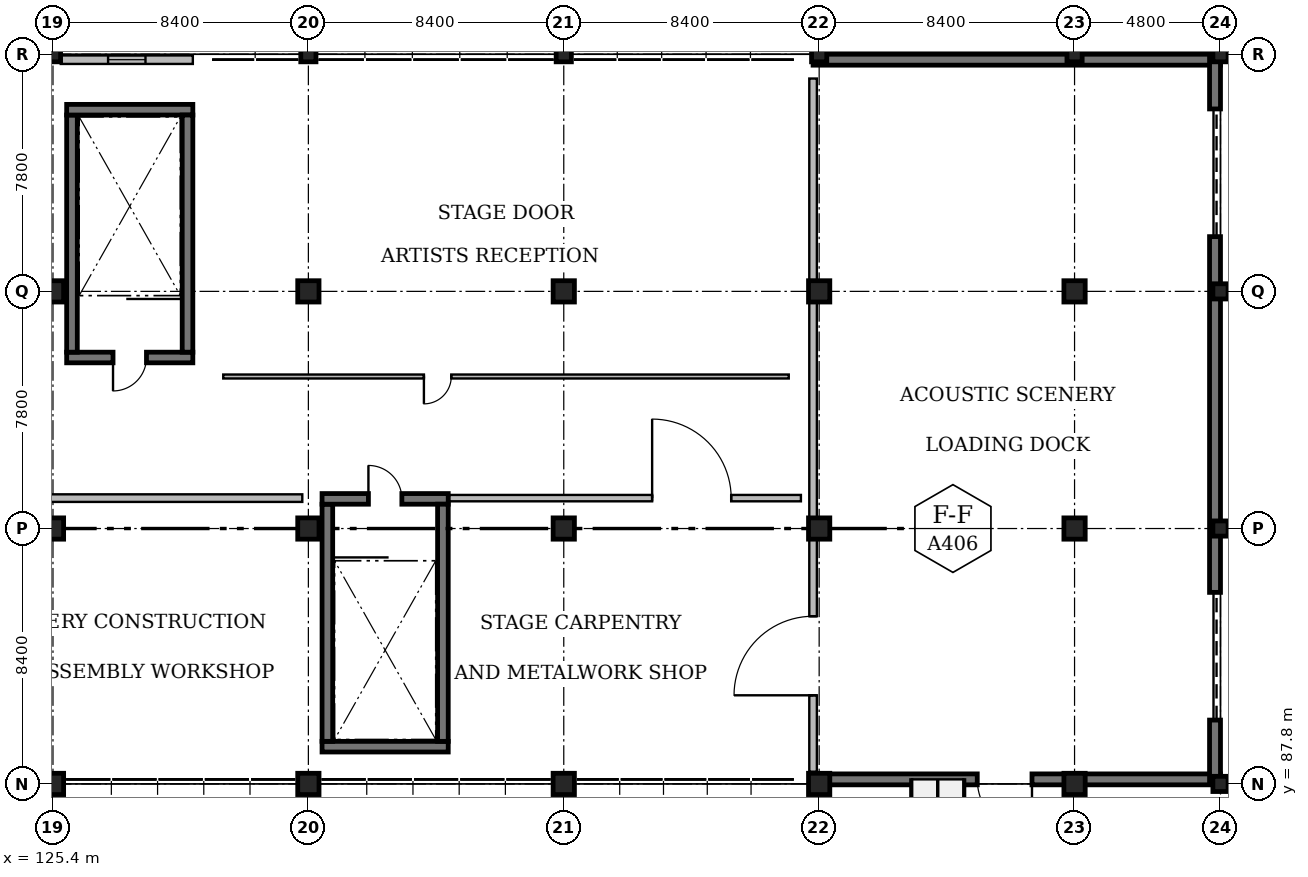
"""IFC4 building model, lengths in metres.
Left out: names, types, materials, properties, quantities, classifications, styles, units other than length and angle.
Written with IfcOpenShell. Run it as: python <this file> out.ifc"""

import sys

from ifc_helpers import new_model, si_unit, direction, frame, frame_2d, origin, origin_2d, place, context, subcontext, project, spatial, rectangle, extrude, element, fill, save


model = new_model("IFC4")
c1 = context("Model", 3, precision=1e-05, world=origin(), true_north=direction((0.0, 1.0)))
c2 = subcontext(c1, "Body", "Model", "MODEL_VIEW")
j1 = project(units=[si_unit("LENGTHUNIT", "METRE"), si_unit("PLANEANGLEUNIT", "RADIAN")], contexts=[c1])
p1 = place(None, origin())
s1 = spatial("IfcSite", under=j1, at=p1, CompositionType="ELEMENT")
p2 = place(p1, origin())
s2 = spatial("IfcBuilding", under=s1, at=p2, CompositionType="ELEMENT")
p3 = place(p2, origin())
s3 = spatial("IfcBuildingStorey", under=s2, at=p3, CompositionType="ELEMENT", Elevation=0.0)
for number, where, z_axis, x_axis in (
    (1, (125.4, 87.8, 0.0), (0.0, 0.0, 1.0), (1.0, 0.0, 0.0)),
    (2, (125.4, 96.2, 0.0), (0.0, 0.0, 1.0), (1.0, 0.0, 0.0)),
    (3, (125.4, 104.0, 0.0), (0.0, 0.0, 1.0), (1.0, 0.0, 0.0)),
):
    element("IfcColumn", number, at=place(p3, frame(where, z_axis=z_axis, x_axis=x_axis)), inside=s3, PredefinedType="COLUMN", context=c2, shape_type="SweptSolid", body=[
        extrude(rectangle(XDim=0.7, YDim=0.7, at=origin_2d()), origin(), (0.0, 0.0, 1.0), 4.8),
    ])
p4 = place(p3, frame((125.4, 111.8, 0.0), z_axis=(0.0, 0.0, 1.0), x_axis=(1.0, 0.0, 0.0)))
e4 = element("IfcColumn", 4, at=p4, inside=s3, PredefinedType="COLUMN", context=c2, shape_type="SweptSolid", body=[
    extrude(rectangle(XDim=0.5, YDim=0.5, at=origin_2d()), origin(), (0.0, 0.0, 1.0), 4.8),
])
for number, where, z_axis, x_axis in (
    (5, (133.8, 87.8, 0.0), (0.0, 0.0, 1.0), (1.0, 0.0, 0.0)),
    (6, (133.8, 96.2, 0.0), (0.0, 0.0, 1.0), (1.0, 0.0, 0.0)),
    (7, (133.8, 104.0, 0.0), (0.0, 0.0, 1.0), (1.0, 0.0, 0.0)),
):
    element("IfcColumn", number, at=place(p3, frame(where, z_axis=z_axis, x_axis=x_axis)), inside=s3, PredefinedType="COLUMN", context=c2, shape_type="SweptSolid", body=[
        extrude(rectangle(XDim=0.7, YDim=0.7, at=origin_2d()), origin(), (0.0, 0.0, 1.0), 4.8),
    ])
p5 = place(p3, frame((133.8, 111.8, 0.0), z_axis=(0.0, 0.0, 1.0), x_axis=(1.0, 0.0, 0.0)))
e8 = element("IfcColumn", 8, at=p5, inside=s3, PredefinedType="COLUMN", context=c2, shape_type="SweptSolid", body=[
    extrude(rectangle(XDim=0.5, YDim=0.5, at=origin_2d()), origin(), (0.0, 0.0, 1.0), 4.8),
])
for number, where, z_axis, x_axis in (
    (9, (142.2, 87.8, 0.0), (0.0, 0.0, 1.0), (1.0, 0.0, 0.0)),
    (10, (142.2, 96.2, 0.0), (0.0, 0.0, 1.0), (1.0, 0.0, 0.0)),
    (11, (142.2, 104.0, 0.0), (0.0, 0.0, 1.0), (1.0, 0.0, 0.0)),
):
    element("IfcColumn", number, at=place(p3, frame(where, z_axis=z_axis, x_axis=x_axis)), inside=s3, PredefinedType="COLUMN", context=c2, shape_type="SweptSolid", body=[
        extrude(rectangle(XDim=0.7, YDim=0.7, at=origin_2d()), origin(), (0.0, 0.0, 1.0), 4.8),
    ])
p6 = place(p3, frame((142.2, 111.8, 0.0), z_axis=(0.0, 0.0, 1.0), x_axis=(1.0, 0.0, 0.0)))
e12 = element("IfcColumn", 12, at=p6, inside=s3, PredefinedType="COLUMN", context=c2, shape_type="SweptSolid", body=[
    extrude(rectangle(XDim=0.5, YDim=0.5, at=origin_2d()), origin(), (0.0, 0.0, 1.0), 4.8),
])
for number, where, z_axis, x_axis in (
    (13, (150.6, 87.8, 0.0), (0.0, 0.0, 1.0), (1.0, 0.0, 0.0)),
    (14, (150.6, 96.2, 0.0), (0.0, 0.0, 1.0), (1.0, 0.0, 0.0)),
    (15, (150.6, 104.0, 0.0), (0.0, 0.0, 1.0), (1.0, 0.0, 0.0)),
):
    element("IfcColumn", number, at=place(p3, frame(where, z_axis=z_axis, x_axis=x_axis)), inside=s3, PredefinedType="COLUMN", context=c2, shape_type="SweptSolid", body=[
        extrude(rectangle(XDim=0.7, YDim=0.7, at=origin_2d()), origin(), (0.0, 0.0, 1.0), 4.8),
    ])
p7 = place(p3, frame((150.6, 111.8, 0.0), z_axis=(0.0, 0.0, 1.0), x_axis=(1.0, 0.0, 0.0)))
e16 = element("IfcColumn", 16, at=p7, inside=s3, PredefinedType="COLUMN", context=c2, shape_type="SweptSolid", body=[
    extrude(rectangle(XDim=0.5, YDim=0.5, at=origin_2d()), origin(), (0.0, 0.0, 1.0), 4.8),
])
for number, where, z_axis, x_axis in (
    (17, (159.0, 87.8, 0.0), (0.0, 0.0, 1.0), (1.0, 0.0, 0.0)),
    (18, (159.0, 96.2, 0.0), (0.0, 0.0, 1.0), (1.0, 0.0, 0.0)),
    (19, (159.0, 104.0, 0.0), (0.0, 0.0, 1.0), (1.0, 0.0, 0.0)),
):
    element("IfcColumn", number, at=place(p3, frame(where, z_axis=z_axis, x_axis=x_axis)), inside=s3, PredefinedType="COLUMN", context=c2, shape_type="SweptSolid", body=[
        extrude(rectangle(XDim=0.7, YDim=0.7, at=origin_2d()), origin(), (0.0, 0.0, 1.0), 4.66),
    ])
for number, where, z_axis, x_axis in (
    (20, (159.0, 111.8, 0.0), (0.0, 0.0, 1.0), (1.0, 0.0, 0.0)),
    (21, (163.8, 87.8, 0.0), (0.0, 0.0, 1.0), (1.0, 0.0, 0.0)),
    (22, (163.8, 96.2, 0.0), (0.0, 0.0, 1.0), (1.0, 0.0, 0.0)),
    (23, (163.8, 104.0, 0.0), (0.0, 0.0, 1.0), (1.0, 0.0, 0.0)),
    (24, (163.8, 111.8, 0.0), (0.0, 0.0, 1.0), (1.0, 0.0, 0.0)),
):
    element("IfcColumn", number, at=place(p3, frame(where, z_axis=z_axis, x_axis=x_axis)), inside=s3, PredefinedType="COLUMN", context=c2, shape_type="SweptSolid", body=[
        extrude(rectangle(XDim=0.5, YDim=0.5, at=origin_2d()), origin(), (0.0, 0.0, 1.0), 4.66),
    ])
p8 = place(p3, frame((130.0, 101.825, 0.0), z_axis=(0.0, 0.0, 1.0), x_axis=(-1.0, 0.0, 0.0)))
e25 = element("IfcWall", 25, at=p8, inside=s3, PredefinedType="SOLIDWALL", context=c2, shape_type="SweptSolid", body=[
    extrude(rectangle(XDim=4.15, YDim=0.35, at=frame_2d((2.075, 0.0))), origin(), (0.0, 0.0, 1.0), 4.54),
])
p9 = place(p8, frame((1.525, 0.0, 0.0)))
e26 = element("IfcOpeningElement", 26, at=p9, cuts=e25, PredefinedType="OPENING", context=c2, shape_type="SweptSolid", body=[
    extrude(rectangle(XDim=1.1, YDim=2.15, at=frame_2d((0.55, 1.075))), frame((0.0, 0.195, 0.0), z_axis=(0.0, -1.0, 0.0), x_axis=(1.0, 0.0, 0.0)), (0.0, 0.0, 1.0), 0.39),
])
p10 = place(p3, frame((126.025, 102.0, 0.0), z_axis=(0.0, 0.0, 1.0), x_axis=(0.0, 1.0, 0.0)))
e27 = element("IfcWall", 27, at=p10, inside=s3, PredefinedType="SOLIDWALL", context=c2, shape_type="SweptSolid", body=[
    extrude(rectangle(XDim=7.8, YDim=0.35, at=frame_2d((3.9, 0.0))), origin(), (0.0, 0.0, 1.0), 4.54),
])
p11 = place(p3, frame((125.85, 109.975, 0.0), z_axis=(0.0, 0.0, 1.0), x_axis=(1.0, 0.0, 0.0)))
e28 = element("IfcWall", 28, at=p11, inside=s3, PredefinedType="SOLIDWALL", context=c2, shape_type="SweptSolid", body=[
    extrude(rectangle(XDim=4.15, YDim=0.35, at=frame_2d((2.075, 0.0))), origin(), (0.0, 0.0, 1.0), 4.54),
])
p12 = place(p3, frame((129.825, 109.8, 0.0), z_axis=(0.0, 0.0, 1.0), x_axis=(0.0, -1.0, 0.0)))
e29 = element("IfcWall", 29, at=p12, inside=s3, PredefinedType="SOLIDWALL", context=c2, shape_type="SweptSolid", body=[
    extrude(rectangle(XDim=7.8, YDim=0.35, at=frame_2d((3.9, 0.0))), origin(), (0.0, 0.0, 1.0), 4.54),
])
p13 = place(p3, frame((138.4, 89.025, 0.0), z_axis=(0.0, 0.0, 1.0), x_axis=(-1.0, 0.0, 0.0)))
e30 = element("IfcWall", 30, at=p13, inside=s3, PredefinedType="SOLIDWALL", context=c2, shape_type="SweptSolid", body=[
    extrude(rectangle(XDim=4.15, YDim=0.35, at=frame_2d((2.075, 0.0))), origin(), (0.0, 0.0, 1.0), 4.56),
])
p14 = place(p3, frame((134.425, 89.2, 0.0), z_axis=(0.0, 0.0, 1.0), x_axis=(0.0, 1.0, 0.0)))
e31 = element("IfcWall", 31, at=p14, inside=s3, PredefinedType="SOLIDWALL", context=c2, shape_type="SweptSolid", body=[
    extrude(rectangle(XDim=7.8, YDim=0.35, at=frame_2d((3.9, 0.0))), origin(), (0.0, 0.0, 1.0), 4.56),
])
p15 = place(p3, frame((134.25, 97.175, 0.0), z_axis=(0.0, 0.0, 1.0), x_axis=(1.0, 0.0, 0.0)))
e32 = element("IfcWall", 32, at=p15, inside=s3, PredefinedType="SOLIDWALL", context=c2, shape_type="SweptSolid", body=[
    extrude(rectangle(XDim=4.15, YDim=0.35, at=frame_2d((2.075, 0.0))), origin(), (0.0, 0.0, 1.0), 4.56),
])
p16 = place(p15, frame((1.525, 0.0, 0.0)))
e33 = element("IfcOpeningElement", 33, at=p16, cuts=e32, PredefinedType="OPENING", context=c2, shape_type="SweptSolid", body=[
    extrude(rectangle(XDim=1.1, YDim=2.15, at=frame_2d((0.55, 1.075))), frame((0.0, 0.195, 0.0), z_axis=(0.0, -1.0, 0.0), x_axis=(1.0, 0.0, 0.0)), (0.0, 0.0, 1.0), 0.39),
])
p17 = place(p3, frame((138.225, 97.0, 0.0), z_axis=(0.0, 0.0, 1.0), x_axis=(0.0, -1.0, 0.0)))
e34 = element("IfcWall", 34, at=p17, inside=s3, PredefinedType="SOLIDWALL", context=c2, shape_type="SweptSolid", body=[
    extrude(rectangle(XDim=7.8, YDim=0.35, at=frame_2d((3.9, 0.0))), origin(), (0.0, 0.0, 1.0), 4.56),
])
p18 = place(p3, frame((125.655, 111.62, 0.0), z_axis=(0.0, 0.0, 1.0), x_axis=(1.0, 0.0, 0.0)))
e35 = element("IfcWall", 35, at=p18, inside=s3, PredefinedType="SOLIDWALL", context=c2, shape_type="SweptSolid", body=[
    extrude(rectangle(XDim=4.345, YDim=0.28, at=frame_2d((2.172, 0.0))), origin(), (0.0, 0.0, 1.0), 3.873),
])
p19 = place(p18, frame((1.558, 0.0, 0.95)))
e36 = element("IfcOpeningElement", 36, at=p19, cuts=e35, PredefinedType="OPENING", context=c2, shape_type="SweptSolid", body=[
    extrude(rectangle(XDim=1.23, YDim=1.9, at=frame_2d((0.615, 0.95))), frame((0.0, 0.16, 0.0), z_axis=(0.0, -1.0, 0.0), x_axis=(1.0, 0.0, 0.0)), (0.0, 0.0, 1.0), 0.32),
])
p20 = place(p3, frame((150.4, 111.62, 0.0), z_axis=(0.0, 0.0, 1.0), x_axis=(1.0, 0.0, 0.0)))
e37 = element("IfcWall", 37, at=p20, inside=s3, PredefinedType="SOLIDWALL", context=c2, shape_type="SweptSolid", body=[
    extrude(rectangle(XDim=13.4, YDim=0.36, at=frame_2d((6.7, 0.0))), origin(), (0.0, 0.0, 1.0), 4.8),
])
p21 = place(p3, frame((163.8, 87.95, 0.0), z_axis=(0.0, 0.0, 1.0), x_axis=(-1.0, 0.0, 0.0)))
e38 = element("IfcWall", 38, at=p21, inside=s3, PredefinedType="SOLIDWALL", context=c2, shape_type="SweptSolid", body=[
    extrude(rectangle(XDim=13.4, YDim=0.36, at=frame_2d((6.7, 0.0))), origin(), (0.0, 0.0, 1.0), 4.8),
])
p22 = place(p21, frame((6.2, 0.0, 0.0)))
e39 = element("IfcOpeningElement", 39, at=p22, cuts=e38, PredefinedType="OPENING", context=c2, shape_type="SweptSolid", body=[
    extrude(rectangle(XDim=1.8, YDim=2.2, at=frame_2d((0.9, 1.1))), frame((0.0, 0.2, 0.0), z_axis=(0.0, -1.0, 0.0), x_axis=(1.0, 0.0, 0.0)), (0.0, 0.0, 1.0), 0.4),
])
p23 = place(p3, frame((163.62, 87.8, 0.0), z_axis=(0.0, 0.0, 1.0), x_axis=(0.0, 1.0, 0.0)))
e40 = element("IfcWall", 40, at=p23, inside=s3, PredefinedType="SOLIDWALL", context=c2, shape_type="SweptSolid", body=[
    extrude(rectangle(XDim=24.0, YDim=0.36, at=frame_2d((12.0, 0.0))), origin(), (0.0, 0.0, 1.0), 4.8),
])
p24 = place(p23, frame((2.1, 0.0, 0.0)))
e41 = element("IfcOpeningElement", 41, at=p24, cuts=e40, PredefinedType="OPENING", context=c2, shape_type="SweptSolid", body=[
    extrude(rectangle(XDim=4.2, YDim=3.8, at=frame_2d((2.1, 1.9))), frame((0.0, 0.2, 0.0), z_axis=(0.0, -1.0, 0.0), x_axis=(1.0, 0.0, 0.0)), (0.0, 0.0, 1.0), 0.4),
])
p25 = place(p23, frame((18.0, 0.0, 0.0)))
e42 = element("IfcOpeningElement", 42, at=p25, cuts=e40, PredefinedType="OPENING", context=c2, shape_type="SweptSolid", body=[
    extrude(rectangle(XDim=4.2, YDim=3.8, at=frame_2d((2.1, 1.9))), frame((0.0, 0.2, 0.0), z_axis=(0.0, -1.0, 0.0), x_axis=(1.0, 0.0, 0.0)), (0.0, 0.0, 1.0), 0.4),
])
p26 = place(p3, frame((115.2, 97.2, 0.0), z_axis=(0.0, 0.0, 1.0), x_axis=(1.0, 0.0, 0.0)))
e43 = element("IfcWall", 43, at=p26, inside=s3, PredefinedType="PARTITIONING", context=c2, shape_type="SweptSolid", body=[
    extrude(rectangle(XDim=18.4, YDim=0.25, at=frame_2d((9.2, 0.0))), origin(), (0.0, 0.0, 1.0), 4.54),
])
p27 = place(p26, frame((4.806, 0.0, 0.0)))
e44 = element("IfcOpeningElement", 44, at=p27, cuts=e43, PredefinedType="OPENING", context=c2, shape_type="SweptSolid", body=[
    extrude(rectangle(XDim=2.6, YDim=3.2, at=frame_2d((1.3, 1.6))), frame((0.0, 0.145, 0.0), z_axis=(0.0, -1.0, 0.0), x_axis=(1.0, 0.0, 0.0)), (0.0, 0.0, 1.0), 0.29),
])
p28 = place(p3, frame((150.4, 88.2, 0.0), z_axis=(0.0, 0.0, 1.0), x_axis=(0.0, 1.0, 0.0)))
e45 = element("IfcWall", 45, at=p28, inside=s3, PredefinedType="PARTITIONING", context=c2, shape_type="SweptSolid", body=[
    extrude(rectangle(XDim=7.63, YDim=0.25, at=frame_2d((3.815, 0.0))), origin(), (0.0, 0.0, 1.0), 3.66),
])
p29 = place(p28, frame((2.515, 0.0, 0.0)))
e46 = element("IfcOpeningElement", 46, at=p29, cuts=e45, PredefinedType="OPENING", context=c2, shape_type="SweptSolid", body=[
    extrude(rectangle(XDim=2.6, YDim=3.2, at=frame_2d((1.3, 1.6))), frame((0.0, 0.145, 0.0), z_axis=(0.0, -1.0, 0.0), x_axis=(1.0, 0.0, 0.0)), (0.0, 0.0, 1.0), 0.29),
])
p30 = place(p3, frame((150.4, 96.57, 0.0), z_axis=(0.0, 0.0, 1.0), x_axis=(0.0, 1.0, 0.0)))
e47 = element("IfcWall", 47, at=p30, inside=s3, PredefinedType="PARTITIONING", context=c2, shape_type="SweptSolid", body=[
    extrude(rectangle(XDim=7.06, YDim=0.25, at=frame_2d((3.53, 0.0))), origin(), (0.0, 0.0, 1.0), 3.86),
])
p31 = place(p3, frame((150.4, 104.37, 0.0), z_axis=(0.0, 0.0, 1.0), x_axis=(0.0, 1.0, 0.0)))
e48 = element("IfcWall", 48, at=p31, inside=s3, PredefinedType="PARTITIONING", context=c2, shape_type="SweptSolid", body=[
    extrude(rectangle(XDim=6.63, YDim=0.25, at=frame_2d((3.315, 0.0))), origin(), (0.0, 0.0, 1.0), 3.86),
])
p32 = place(p3, frame((149.6, 101.2, 0.0), z_axis=(0.0, 0.0, 1.0), x_axis=(-1.0, 0.0, 0.0)))
e49 = element("IfcWall", 49, at=p32, inside=s3, PredefinedType="PARTITIONING", context=c2, shape_type="SweptSolid", body=[
    extrude(rectangle(XDim=18.6, YDim=0.13, at=frame_2d((9.3, 0.0))), origin(), (0.0, 0.0, 1.0), 4.54),
])
p33 = place(p32, frame((11.1, 0.0, 0.0)))
e50 = element("IfcOpeningElement", 50, at=p33, cuts=e49, PredefinedType="OPENING", context=c2, shape_type="SweptSolid", body=[
    extrude(rectangle(XDim=0.9, YDim=2.15, at=frame_2d((0.45, 1.075))), frame((0.0, 0.085, 0.0), z_axis=(0.0, -1.0, 0.0), x_axis=(1.0, 0.0, 0.0)), (0.0, 0.0, 1.0), 0.17),
])
p34 = place(p3, frame((138.44, 97.2, 0.0), z_axis=(0.0, 0.0, 1.0), x_axis=(1.0, 0.0, 0.0)))
e51 = element("IfcWall", 51, at=p34, inside=s3, PredefinedType="PARTITIONING", context=c2, shape_type="SweptSolid", body=[
    extrude(rectangle(XDim=11.56, YDim=0.21, at=frame_2d((5.78, 0.0))), origin(), (0.0, 0.0, 1.0), 4.56),
])
p35 = place(p34, frame((6.667, 0.0, 0.0)))
e52 = element("IfcOpeningElement", 52, at=p35, cuts=e51, PredefinedType="OPENING", context=c2, shape_type="SweptSolid", body=[
    extrude(rectangle(XDim=2.6, YDim=3.2, at=frame_2d((1.3, 1.6))), frame((0.0, 0.125, 0.0), z_axis=(0.0, -1.0, 0.0), x_axis=(1.0, 0.0, 0.0)), (0.0, 0.0, 1.0), 0.25),
])
p36 = place(p9, origin())
e53 = element("IfcDoor", 53, at=p36, inside=s3, OperationType="SINGLE_SWING_RIGHT", PredefinedType="DOOR", context=c2, shape_type="SweptSolid", body=[
    extrude(rectangle(XDim=1.1, YDim=2.15, at=frame_2d((0.55, 1.075))), frame((0.0, 0.025, 0.0), z_axis=(0.0, -1.0, 0.0), x_axis=(1.0, 0.0, 0.0)), (0.0, 0.0, 1.0), 0.05),
])
fill(e26, e53)
p37 = place(p16, origin())
e54 = element("IfcDoor", 54, at=p37, inside=s3, OperationType="SINGLE_SWING_LEFT", PredefinedType="DOOR", context=c2, shape_type="SweptSolid", body=[
    extrude(rectangle(XDim=1.1, YDim=2.15, at=frame_2d((0.55, 1.075))), frame((0.0, 0.025, 0.0), z_axis=(0.0, -1.0, 0.0), x_axis=(1.0, 0.0, 0.0)), (0.0, 0.0, 1.0), 0.05),
])
fill(e33, e54)
p38 = place(p19, origin())
e55 = element("IfcWindow", 55, at=p38, inside=s3, PartitioningType="SINGLE_PANEL", PredefinedType="WINDOW", context=c2, shape_type="SweptSolid", body=[
    extrude(rectangle(XDim=1.23, YDim=1.9, at=frame_2d((0.615, 0.95))), frame((0.0, 0.03, 0.0), z_axis=(0.0, -1.0, 0.0), x_axis=(1.0, 0.0, 0.0)), (0.0, 0.0, 1.0), 0.06),
])
fill(e36, e55)
p39 = place(p22, origin())
e56 = element("IfcDoor", 56, at=p39, inside=s3, OperationType="SINGLE_SWING_LEFT", PredefinedType="DOOR", context=c2, shape_type="SweptSolid", body=[
    extrude(rectangle(XDim=1.8, YDim=2.2, at=frame_2d((0.9, 1.1))), frame((0.0, 0.025, 0.0), z_axis=(0.0, -1.0, 0.0), x_axis=(1.0, 0.0, 0.0)), (0.0, 0.0, 1.0), 0.05),
])
fill(e39, e56)
p40 = place(p24, origin())
e57 = element("IfcDoor", 57, at=p40, inside=s3, OperationType="SINGLE_SWING_LEFT", PredefinedType="GATE", context=c2, shape_type="SweptSolid", body=[
    extrude(rectangle(XDim=4.2, YDim=3.8, at=frame_2d((2.1, 1.9))), frame((0.0, 0.025, 0.0), z_axis=(0.0, -1.0, 0.0), x_axis=(1.0, 0.0, 0.0)), (0.0, 0.0, 1.0), 0.05),
])
fill(e41, e57)
p41 = place(p25, origin())
e58 = element("IfcDoor", 58, at=p41, inside=s3, OperationType="SINGLE_SWING_LEFT", PredefinedType="GATE", context=c2, shape_type="SweptSolid", body=[
    extrude(rectangle(XDim=4.2, YDim=3.8, at=frame_2d((2.1, 1.9))), frame((0.0, 0.025, 0.0), z_axis=(0.0, -1.0, 0.0), x_axis=(1.0, 0.0, 0.0)), (0.0, 0.0, 1.0), 0.05),
])
fill(e42, e58)
p42 = place(p29, origin())
e59 = element("IfcDoor", 59, at=p42, inside=s3, OperationType="DOUBLE_DOOR_SINGLE_SWING", PredefinedType="DOOR", context=c2, shape_type="SweptSolid", body=[
    extrude(rectangle(XDim=2.6, YDim=3.2, at=frame_2d((1.3, 1.6))), frame((0.0, 0.025, 0.0), z_axis=(0.0, -1.0, 0.0), x_axis=(1.0, 0.0, 0.0)), (0.0, 0.0, 1.0), 0.05),
])
fill(e46, e59)
p43 = place(p33, origin())
e60 = element("IfcDoor", 60, at=p43, inside=s3, OperationType="SINGLE_SWING_RIGHT", PredefinedType="DOOR", context=c2, shape_type="SweptSolid", body=[
    extrude(rectangle(XDim=0.9, YDim=2.15, at=frame_2d((0.45, 1.075))), frame((0.0, 0.025, 0.0), z_axis=(0.0, -1.0, 0.0), x_axis=(1.0, 0.0, 0.0)), (0.0, 0.0, 1.0), 0.05),
])
fill(e50, e60)
p44 = place(p35, origin())
e61 = element("IfcDoor", 61, at=p44, inside=s3, OperationType="DOUBLE_DOOR_SINGLE_SWING", PredefinedType="DOOR", context=c2, shape_type="SweptSolid", body=[
    extrude(rectangle(XDim=2.6, YDim=3.2, at=frame_2d((1.3, 1.6))), frame((0.0, 0.025, 0.0), z_axis=(0.0, -1.0, 0.0), x_axis=(1.0, 0.0, 0.0)), (0.0, 0.0, 1.0), 0.05),
])
fill(e52, e61)
save(model, sys.argv[1])
